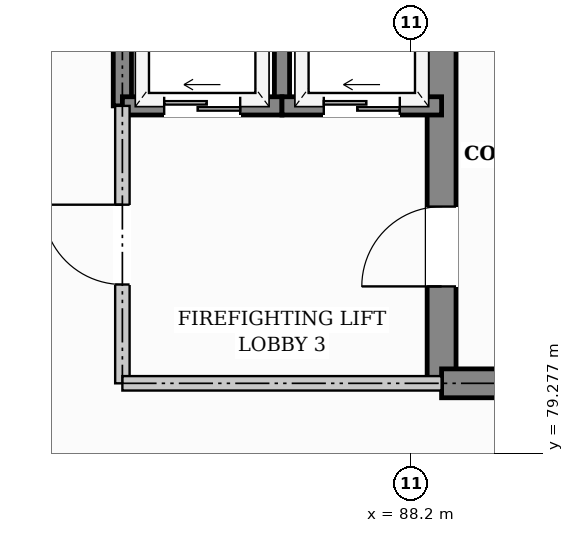
"""IFC4 building model, lengths in metres.
Left out: names, types, materials, properties, quantities, classifications, styles, units other than length and angle.
Written with IfcOpenShell. Run it as: python <this file> out.ifc"""

import sys

from ifc_helpers import new_model, si_unit, direction, frame, frame_2d, origin, place, context, subcontext, project, spatial, rectangle, extrude, element, fill, save


model = new_model("IFC4")
c1 = context("Model", 3, precision=1e-05, world=origin(), true_north=direction((0.0, 1.0)))
c2 = subcontext(c1, "Body", "Model", "MODEL_VIEW")
j1 = project(units=[si_unit("LENGTHUNIT", "METRE"), si_unit("PLANEANGLEUNIT", "RADIAN")], contexts=[c1])
p1 = place(None, origin())
s1 = spatial("IfcSite", under=j1, at=p1, CompositionType="ELEMENT")
p2 = place(p1, origin())
s2 = spatial("IfcBuilding", under=s1, at=p2, CompositionType="ELEMENT")
p3 = place(p2, frame((0.0, 0.0, -4.2)))
s3 = spatial("IfcBuildingStorey", under=s2, at=p3, CompositionType="ELEMENT", Elevation=-4.2)
p4 = place(p3, frame((88.6, 80.2, 0.0), z_axis=(0.0, 0.0, 1.0), x_axis=(0.0, 1.0, 0.0)))
e1 = element("IfcWall", 1, at=p4, inside=s3, PredefinedType="SHEAR", context=c2, shape_type="SweptSolid", body=[
    extrude(rectangle(XDim=6.0, YDim=0.38, at=frame_2d((3.0, 0.0))), origin(), (0.0, 0.0, 1.0), 3.84),
])
p5 = place(p4, frame((1.275, 0.0, 0.0)))
e2 = element("IfcOpeningElement", 2, at=p5, cuts=e1, PredefinedType="OPENING", context=c2, shape_type="SweptSolid", body=[
    extrude(rectangle(XDim=1.05, YDim=2.15, at=frame_2d((0.525, 1.075))), frame((0.0, 0.2, 0.0), z_axis=(0.0, -1.0, 0.0), x_axis=(1.0, 0.0, 0.0)), (0.0, 0.0, 1.0), 0.4),
])
p6 = place(p3, frame((88.6, 80.2, 0.0), z_axis=(0.0, 0.0, 1.0), x_axis=(1.0, 0.0, 0.0)))
e3 = element("IfcWall", 3, at=p6, inside=s3, PredefinedType="SHEAR", context=c2, shape_type="SweptSolid", body=[
    extrude(rectangle(XDim=7.0, YDim=0.38, at=frame_2d((3.5, 0.0))), origin(), (0.0, 0.0, 1.0), 3.84),
])
p7 = place(p3, frame((84.4, 83.85, 0.0), z_axis=(0.0, 0.0, 1.0), x_axis=(0.0, 1.0, 0.0)))
e4 = element("IfcWall", 4, at=p7, inside=s3, PredefinedType="SHEAR", context=c2, shape_type="SweptSolid", body=[
    extrude(rectangle(XDim=2.35, YDim=0.24, at=frame_2d((1.175, 0.0))), origin(), (0.0, 0.0, 1.0), 3.84),
])
p8 = place(p3, frame((86.5, 83.85, 0.0), z_axis=(0.0, 0.0, 1.0), x_axis=(0.0, 1.0, 0.0)))
e5 = element("IfcWall", 5, at=p8, inside=s3, PredefinedType="SHEAR", context=c2, shape_type="SweptSolid", body=[
    extrude(rectangle(XDim=2.35, YDim=0.2, at=frame_2d((1.175, 0.0))), origin(), (0.0, 0.0, 1.0), 3.84),
])
p9 = place(p3, frame((84.4, 83.85, 0.0), z_axis=(0.0, 0.0, 1.0), x_axis=(1.0, 0.0, 0.0)))
e6 = element("IfcWall", 6, at=p9, inside=s3, PredefinedType="SHEAR", context=c2, shape_type="SweptSolid", body=[
    extrude(rectangle(XDim=2.1, YDim=0.24, at=frame_2d((1.05, 0.0))), origin(), (0.0, 0.0, 1.0), 3.84),
])
p10 = place(p9, frame((0.55, 0.0, 0.0)))
e7 = element("IfcOpeningElement", 7, at=p10, cuts=e6, PredefinedType="OPENING", context=c2, shape_type="SweptSolid", body=[
    extrude(rectangle(XDim=1.0, YDim=2.1, at=frame_2d((0.5, 1.05))), frame((0.0, 0.13, 0.0), z_axis=(0.0, -1.0, 0.0), x_axis=(1.0, 0.0, 0.0)), (0.0, 0.0, 1.0), 0.26),
])
p11 = place(p3, frame((86.5, 83.85, 0.0), z_axis=(0.0, 0.0, 1.0), x_axis=(1.0, 0.0, 0.0)))
e8 = element("IfcWall", 8, at=p11, inside=s3, PredefinedType="SHEAR", context=c2, shape_type="SweptSolid", body=[
    extrude(rectangle(XDim=2.1, YDim=0.24, at=frame_2d((1.05, 0.0))), origin(), (0.0, 0.0, 1.0), 3.84),
])
p12 = place(p11, frame((0.55, 0.0, 0.0)))
e9 = element("IfcOpeningElement", 9, at=p12, cuts=e8, PredefinedType="OPENING", context=c2, shape_type="SweptSolid", body=[
    extrude(rectangle(XDim=1.0, YDim=2.1, at=frame_2d((0.5, 1.05))), frame((0.0, 0.13, 0.0), z_axis=(0.0, -1.0, 0.0), x_axis=(1.0, 0.0, 0.0)), (0.0, 0.0, 1.0), 0.26),
])
p13 = place(p3, frame((84.4, 80.2, 0.0), z_axis=(0.0, 0.0, 1.0), x_axis=(0.0, 1.0, 0.0)))
e10 = element("IfcWall", 10, at=p13, inside=s3, PredefinedType="PARTITIONING", context=c2, shape_type="SweptSolid", body=[
    extrude(rectangle(XDim=3.65, YDim=0.19, at=frame_2d((1.825, 0.0))), origin(), (0.0, 0.0, 1.0), 3.84),
])
p14 = place(p13, frame((1.3, 0.0, 0.0)))
e11 = element("IfcOpeningElement", 11, at=p14, cuts=e10, PredefinedType="OPENING", context=c2, shape_type="SweptSolid", body=[
    extrude(rectangle(XDim=1.05, YDim=2.15, at=frame_2d((0.525, 1.075))), frame((0.0, 0.105, 0.0), z_axis=(0.0, -1.0, 0.0), x_axis=(1.0, 0.0, 0.0)), (0.0, 0.0, 1.0), 0.21),
])
p15 = place(p3, frame((84.4, 80.2, 0.0), z_axis=(0.0, 0.0, 1.0), x_axis=(1.0, 0.0, 0.0)))
e12 = element("IfcWall", 12, at=p15, inside=s3, PredefinedType="PARTITIONING", context=c2, shape_type="SweptSolid", body=[
    extrude(rectangle(XDim=4.2, YDim=0.19, at=frame_2d((2.1, 0.0))), origin(), (0.0, 0.0, 1.0), 3.84),
])
p16 = place(p5, origin())
e13 = element("IfcDoor", 13, at=p16, inside=s3, OperationType="SINGLE_SWING_LEFT", PredefinedType="DOOR", context=c2, shape_type="SweptSolid", body=[
    extrude(rectangle(XDim=1.05, YDim=2.15, at=frame_2d((0.525, 1.075))), frame((0.0, 0.025, 0.0), z_axis=(0.0, -1.0, 0.0), x_axis=(1.0, 0.0, 0.0)), (0.0, 0.0, 1.0), 0.05),
])
fill(e2, e13)
p17 = place(p10, origin())
e14 = element("IfcDoor", 14, at=p17, inside=s3, OperationType="SLIDING_TO_LEFT", PredefinedType="DOOR", context=c2, shape_type="SweptSolid", body=[
    extrude(rectangle(XDim=1.0, YDim=2.1, at=frame_2d((0.5, 1.05))), frame((0.0, 0.025, 0.0), z_axis=(0.0, -1.0, 0.0), x_axis=(1.0, 0.0, 0.0)), (0.0, 0.0, 1.0), 0.05),
])
fill(e7, e14)
p18 = place(p12, origin())
e15 = element("IfcDoor", 15, at=p18, inside=s3, OperationType="SLIDING_TO_LEFT", PredefinedType="DOOR", context=c2, shape_type="SweptSolid", body=[
    extrude(rectangle(XDim=1.0, YDim=2.1, at=frame_2d((0.5, 1.05))), frame((0.0, 0.025, 0.0), z_axis=(0.0, -1.0, 0.0), x_axis=(1.0, 0.0, 0.0)), (0.0, 0.0, 1.0), 0.05),
])
fill(e9, e15)
p19 = place(p14, origin())
e16 = element("IfcDoor", 16, at=p19, inside=s3, OperationType="SINGLE_SWING_RIGHT", PredefinedType="DOOR", context=c2, shape_type="SweptSolid", body=[
    extrude(rectangle(XDim=1.05, YDim=2.15, at=frame_2d((0.525, 1.075))), frame((0.0, 0.025, 0.0), z_axis=(0.0, -1.0, 0.0), x_axis=(1.0, 0.0, 0.0)), (0.0, 0.0, 1.0), 0.05),
])
fill(e11, e16)
save(model, sys.argv[1])
